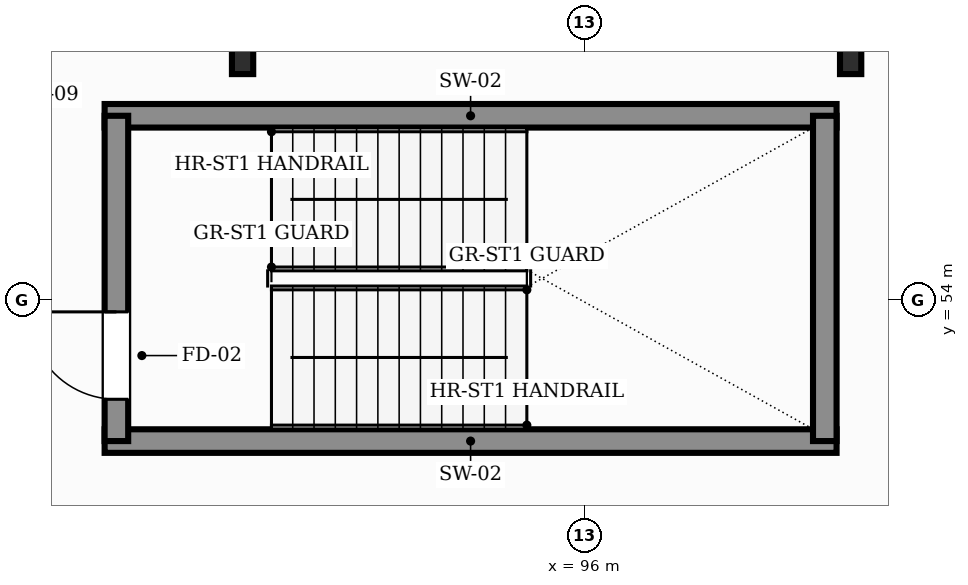
"""IFC4 building model, lengths in metres.
Left out: names, types, materials, properties, quantities, classifications, styles, units other than length and angle.
Written with IfcOpenShell. Run it as: python <this file> out.ifc"""

import sys

from ifc_helpers import new_model, si_unit, direction, frame, frame_2d, origin, origin_2d, place, context, subcontext, project, spatial, rectangle, i_section, extrude, element, fill, save


model = new_model("IFC4")
c1 = context("Model", 3, precision=1e-05, world=origin(), true_north=direction((0.0, 1.0)))
c2 = subcontext(c1, "Body", "Model", "MODEL_VIEW")
j1 = project(units=[si_unit("LENGTHUNIT", "METRE"), si_unit("PLANEANGLEUNIT", "RADIAN")], contexts=[c1])
p1 = place(None, origin())
s1 = spatial("IfcSite", under=j1, at=p1, CompositionType="ELEMENT")
p2 = place(p1, origin())
s2 = spatial("IfcBuilding", under=s1, at=p2, CompositionType="ELEMENT")
p3 = place(p2, frame((0.0, 0.0, 11.4)))
s3 = spatial("IfcBuildingStorey", under=s2, at=p3, CompositionType="ELEMENT", Elevation=11.4)
for number, where, z_axis, x_axis in (
    (1, (91.5, 57.2, 0.0), (0.0, 0.0, 1.0), (1.0, 0.0, 0.0)),
    (2, (99.5, 57.2, 0.0), (0.0, 0.0, 1.0), (1.0, 0.0, 0.0)),
):
    element("IfcColumn", number, at=place(p3, frame(where, z_axis=z_axis, x_axis=x_axis)), inside=s3, PredefinedType="COLUMN", context=c2, shape_type="SweptSolid", body=[
        extrude(i_section(OverallWidth=0.28, OverallDepth=0.463, WebThickness=0.011, FlangeThickness=0.017, FilletRadius=0.012, at=origin_2d()), origin(), (0.0, 0.0, 1.0), 4.8),
    ])
for number, where, z_axis, x_axis in (
    (3, (89.685, 52.14, 0.0), (0.0, 0.0, 1.0), (1.0, 0.0, 0.0)),
    (4, (89.685, 56.42, 0.0), (0.0, 0.0, 1.0), (1.0, 0.0, 0.0)),
):
    element("IfcWall", number, at=place(p3, frame(where, z_axis=z_axis, x_axis=x_axis)), inside=s3, PredefinedType="SHEAR", context=c2, shape_type="SweptSolid", body=[
        extrude(rectangle(XDim=9.63, YDim=0.31, at=frame_2d((4.815, 0.0))), origin(), (0.0, 0.0, 1.0), 4.8),
    ])
p4 = place(p3, frame((89.84, 52.14, 0.0), z_axis=(0.0, 0.0, 1.0), x_axis=(0.0, 1.0, 0.0)))
e5 = element("IfcWall", 5, at=p4, inside=s3, PredefinedType="SHEAR", context=c2, shape_type="SweptSolid", body=[
    extrude(rectangle(XDim=4.28, YDim=0.31, at=frame_2d((2.14, 0.0))), origin(), (0.0, 0.0, 1.0), 4.8),
])
p5 = place(p4, frame((0.55, 0.0, 0.0)))
e6 = element("IfcOpeningElement", 6, at=p5, cuts=e5, PredefinedType="OPENING", context=c2, shape_type="SweptSolid", body=[
    extrude(rectangle(XDim=1.15, YDim=2.2, at=frame_2d((0.575, 1.1))), frame((0.0, 0.165, 0.0), z_axis=(0.0, -1.0, 0.0), x_axis=(1.0, 0.0, 0.0)), (0.0, 0.0, 1.0), 0.33),
])
p6 = place(p3, frame((99.16, 52.14, 0.0), z_axis=(0.0, 0.0, 1.0), x_axis=(0.0, 1.0, 0.0)))
e7 = element("IfcWall", 7, at=p6, inside=s3, PredefinedType="SHEAR", context=c2, shape_type="SweptSolid", body=[
    extrude(rectangle(XDim=4.28, YDim=0.31, at=frame_2d((2.14, 0.0))), origin(), (0.0, 0.0, 1.0), 4.8),
])
p7 = place(p5, origin())
e8 = element("IfcDoor", 8, at=p7, inside=s3, OperationType="SINGLE_SWING_RIGHT", PredefinedType="DOOR", context=c2, shape_type="SweptSolid", body=[
    extrude(rectangle(XDim=1.15, YDim=2.2, at=frame_2d((0.575, 1.1))), frame((0.0, 0.025, 0.0), z_axis=(0.0, -1.0, 0.0), x_axis=(1.0, 0.0, 0.0)), (0.0, 0.0, 1.0), 0.05),
])
fill(e6, e8)
save(model, sys.argv[1])
